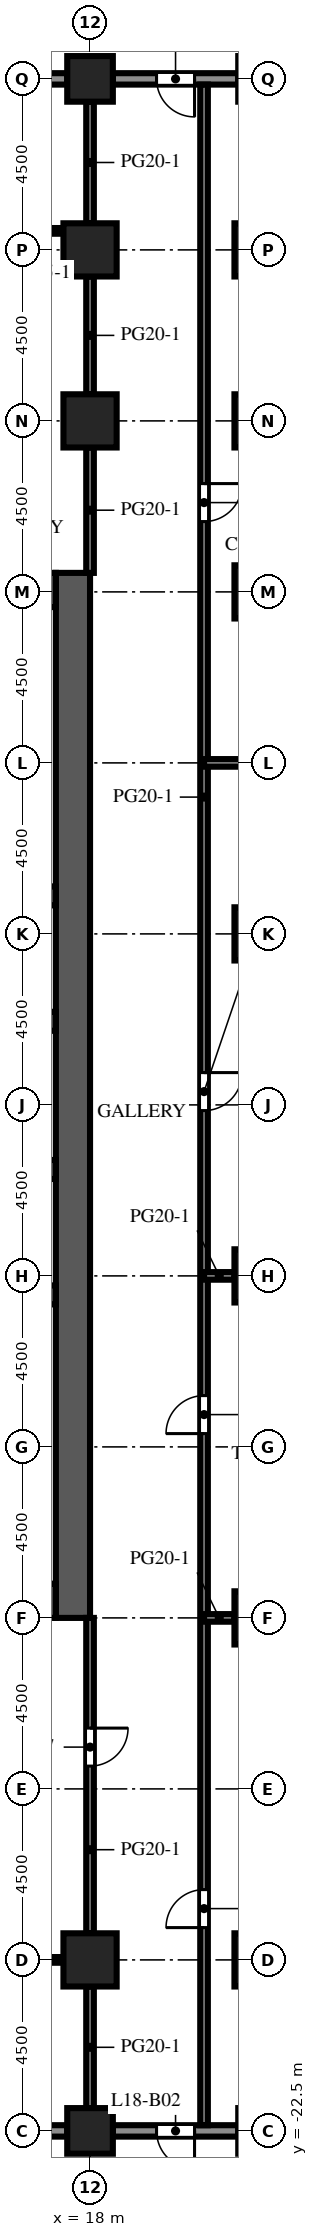
"""IFC4 building model, lengths in metres.
Left out: names, types, materials, properties, quantities, classifications, styles, units other than length and angle.
Written with IfcOpenShell. Run it as: python <this file> out.ifc"""

import sys

from ifc_helpers import new_model, si_unit, direction, frame, frame_2d, origin, origin_2d, place, context, subcontext, project, spatial, rectangle, extrude, element, fill, save


model = new_model("IFC4")
c1 = context("Model", 3, precision=1e-05, world=origin(), true_north=direction((0.0, 1.0)))
c2 = subcontext(c1, "Body", "Model", "MODEL_VIEW")
j1 = project(units=[si_unit("LENGTHUNIT", "METRE"), si_unit("PLANEANGLEUNIT", "RADIAN")], contexts=[c1])
p1 = place(None, origin())
s1 = spatial("IfcSite", under=j1, at=p1, CompositionType="ELEMENT")
p2 = place(p1, origin())
s2 = spatial("IfcBuilding", under=s1, at=p2, CompositionType="ELEMENT")
p3 = place(p2, frame((0.0, 0.0, 82.0)))
s3 = spatial("IfcBuildingStorey", under=s2, at=p3, CompositionType="ELEMENT", Elevation=82.0)
p4 = place(p3, frame((18.0, -22.5, 0.0), z_axis=(0.0, 0.0, 1.0), x_axis=(1.0, 0.0, 0.0)))
e1 = element("IfcColumn", 1, at=p4, inside=s3, PredefinedType="COLUMN", context=c2, shape_type="SweptSolid", body=[
    extrude(rectangle(XDim=1.2, YDim=1.2, at=origin_2d()), origin(), (0.0, 0.0, 1.0), 4.1),
])
p5 = place(p3, frame((18.0, 31.5, -0.45), z_axis=(0.0, 0.0, 1.0), x_axis=(1.0, 0.0, 0.0)))
e2 = element("IfcColumn", 2, at=p5, inside=s3, PredefinedType="COLUMN", context=c2, shape_type="SweptSolid", body=[
    extrude(rectangle(XDim=1.2, YDim=1.2, at=origin_2d()), origin(), (0.0, 0.0, 1.0), 4.55),
])
p6 = place(p3, frame((18.0, -18.0, 0.0), z_axis=(0.0, 0.0, 1.0), x_axis=(1.0, 0.0, 0.0)))
e3 = element("IfcColumn", 3, at=p6, inside=s3, PredefinedType="COLUMN", context=c2, shape_type="SweptSolid", body=[
    extrude(rectangle(XDim=1.4, YDim=1.4, at=origin_2d()), origin(), (0.0, 0.0, 1.0), 4.1),
])
for number, where, z_axis, x_axis in (
    (4, (18.0, 22.5, -0.45), (0.0, 0.0, 1.0), (1.0, 0.0, 0.0)),
    (5, (18.0, 27.0, -0.45), (0.0, 0.0, 1.0), (1.0, 0.0, 0.0)),
):
    element("IfcColumn", number, at=place(p3, frame(where, z_axis=z_axis, x_axis=x_axis)), inside=s3, PredefinedType="COLUMN", context=c2, shape_type="SweptSolid", body=[
        extrude(rectangle(XDim=1.4, YDim=1.4, at=origin_2d()), origin(), (0.0, 0.0, 1.0), 4.55),
    ])
for number, where, z_axis, x_axis in (
    (6, (22.5, -18.0, 0.0), (0.0, 0.0, 1.0), (1.0, 0.0, 0.0)),
    (7, (22.5, -9.0, 0.0), (0.0, 0.0, 1.0), (1.0, 0.0, 0.0)),
    (8, (22.5, 0.0, 0.0), (0.0, 0.0, 1.0), (1.0, 0.0, 0.0)),
    (9, (22.5, 9.0, 0.0), (0.0, 0.0, 1.0), (1.0, 0.0, 0.0)),
    (10, (22.5, 18.0, 0.0), (0.0, 0.0, 1.0), (1.0, 0.0, 0.0)),
    (11, (22.5, 22.5, 0.0), (0.0, 0.0, 1.0), (1.0, 0.0, 0.0)),
    (12, (22.5, 27.0, 0.0), (0.0, 0.0, 1.0), (1.0, 0.0, 0.0)),
):
    element("IfcColumn", number, at=place(p3, frame(where, z_axis=z_axis, x_axis=x_axis)), inside=s3, PredefinedType="COLUMN", context=c2, shape_type="SweptSolid", body=[
        extrude(rectangle(XDim=1.4, YDim=1.4, at=origin_2d()), origin(), (0.0, 0.0, 1.0), 4.1),
    ])
p7 = place(p3, frame((17.55, -9.0, 0.0), z_axis=(0.0, 0.0, 1.0), x_axis=(0.0, 1.0, 0.0)))
e13 = element("IfcWall", 13, at=p7, inside=s3, PredefinedType="SHEAR", context=c2, shape_type="SweptSolid", body=[
    extrude(rectangle(XDim=27.5, YDim=0.9, at=frame_2d((13.75, 0.0))), origin(), (0.0, 0.0, 1.0), 4.1),
])
p8 = place(p7, frame((12.55, 0.0, 0.0)))
e14 = element("IfcOpeningElement", 14, at=p8, cuts=e13, PredefinedType="OPENING", context=c2, shape_type="SweptSolid", body=[
    extrude(rectangle(XDim=2.4, YDim=2.4, at=frame_2d((1.2, 1.2))), frame((0.0, 0.46, 0.0), z_axis=(0.0, -1.0, 0.0), x_axis=(1.0, 0.0, 0.0)), (0.0, 0.0, 1.0), 0.92),
])
p9 = place(p7, frame((6.825, 0.0, 0.0)))
e15 = element("IfcOpeningElement", 15, at=p9, cuts=e13, PredefinedType="OPENING", context=c2, shape_type="SweptSolid", body=[
    extrude(rectangle(XDim=1.2, YDim=2.1, at=frame_2d((0.6, 1.05))), frame((0.0, 0.46, 0.0), z_axis=(0.0, -1.0, 0.0), x_axis=(1.0, 0.0, 0.0)), (0.0, 0.0, 1.0), 0.92),
])
p10 = place(p7, frame((19.475, 0.0, 0.0)))
e16 = element("IfcOpeningElement", 16, at=p10, cuts=e13, PredefinedType="OPENING", context=c2, shape_type="SweptSolid", body=[
    extrude(rectangle(XDim=1.2, YDim=2.1, at=frame_2d((0.6, 1.05))), frame((0.0, 0.46, 0.0), z_axis=(0.0, -1.0, 0.0), x_axis=(1.0, 0.0, 0.0)), (0.0, 0.0, 1.0), 0.92),
])
for number, where, z_axis, x_axis in (
    (17, (6.9, -8.55, 0.0), (0.0, 0.0, 1.0), (1.0, 0.0, 0.0)),
    (18, (6.9, 18.05, 0.0), (0.0, 0.0, 1.0), (1.0, 0.0, 0.0)),
):
    element("IfcWall", number, at=place(p3, frame(where, z_axis=z_axis, x_axis=x_axis)), inside=s3, PredefinedType="SHEAR", context=c2, shape_type="SweptSolid", body=[
        extrude(rectangle(XDim=10.2, YDim=0.9, at=frame_2d((5.1, 0.0))), origin(), (0.0, 0.0, 1.0), 4.1),
    ])
p11 = place(p3, frame((6.9, -0.5, 0.0), z_axis=(0.0, 0.0, 1.0), x_axis=(1.0, 0.0, 0.0)))
e19 = element("IfcWall", 19, at=p11, inside=s3, PredefinedType="SHEAR", context=c2, shape_type="SweptSolid", body=[
    extrude(rectangle(XDim=10.2, YDim=0.5, at=frame_2d((5.1, 0.0))), origin(), (0.0, 0.0, 1.0), 4.1),
])
p12 = place(p3, frame((6.9, 2.8, 0.0), z_axis=(0.0, 0.0, 1.0), x_axis=(1.0, 0.0, 0.0)))
e20 = element("IfcWall", 20, at=p12, inside=s3, PredefinedType="SHEAR", context=c2, shape_type="SweptSolid", body=[
    extrude(rectangle(XDim=10.2, YDim=0.5, at=frame_2d((5.1, 0.0))), origin(), (0.0, 0.0, 1.0), 4.1),
])
p13 = place(p12, frame((0.562, 0.0, 0.0)))
e21 = element("IfcOpeningElement", 21, at=p13, cuts=e20, PredefinedType="OPENING", context=c2, shape_type="SweptSolid", body=[
    extrude(rectangle(XDim=1.1, YDim=2.1, at=frame_2d((0.55, 1.05))), frame((0.0, 0.26, 0.0), z_axis=(0.0, -1.0, 0.0), x_axis=(1.0, 0.0, 0.0)), (0.0, 0.0, 1.0), 0.52),
])
p14 = place(p12, frame((3.238, 0.0, 0.0)))
e22 = element("IfcOpeningElement", 22, at=p14, cuts=e20, PredefinedType="OPENING", context=c2, shape_type="SweptSolid", body=[
    extrude(rectangle(XDim=1.1, YDim=2.1, at=frame_2d((0.55, 1.05))), frame((0.0, 0.26, 0.0), z_axis=(0.0, -1.0, 0.0), x_axis=(1.0, 0.0, 0.0)), (0.0, 0.0, 1.0), 0.52),
])
p15 = place(p12, frame((8.538, 0.0, 0.0)))
e23 = element("IfcOpeningElement", 23, at=p15, cuts=e20, PredefinedType="OPENING", context=c2, shape_type="SweptSolid", body=[
    extrude(rectangle(XDim=1.1, YDim=2.1, at=frame_2d((0.55, 1.05))), frame((0.0, 0.26, 0.0), z_axis=(0.0, -1.0, 0.0), x_axis=(1.0, 0.0, 0.0)), (0.0, 0.0, 1.0), 0.52),
])
p16 = place(p3, frame((6.9, 6.7, 0.0), z_axis=(0.0, 0.0, 1.0), x_axis=(1.0, 0.0, 0.0)))
e24 = element("IfcWall", 24, at=p16, inside=s3, PredefinedType="SHEAR", context=c2, shape_type="SweptSolid", body=[
    extrude(rectangle(XDim=10.2, YDim=0.5, at=frame_2d((5.1, 0.0))), origin(), (0.0, 0.0, 1.0), 4.1),
])
p17 = place(p16, frame((0.562, 0.0, 0.0)))
e25 = element("IfcOpeningElement", 25, at=p17, cuts=e24, PredefinedType="OPENING", context=c2, shape_type="SweptSolid", body=[
    extrude(rectangle(XDim=1.1, YDim=2.1, at=frame_2d((0.55, 1.05))), frame((0.0, 0.26, 0.0), z_axis=(0.0, -1.0, 0.0), x_axis=(1.0, 0.0, 0.0)), (0.0, 0.0, 1.0), 0.52),
])
p18 = place(p16, frame((3.288, 0.0, 0.0)))
e26 = element("IfcOpeningElement", 26, at=p18, cuts=e24, PredefinedType="OPENING", context=c2, shape_type="SweptSolid", body=[
    extrude(rectangle(XDim=1.0, YDim=2.1, at=frame_2d((0.5, 1.05))), frame((0.0, 0.26, 0.0), z_axis=(0.0, -1.0, 0.0), x_axis=(1.0, 0.0, 0.0)), (0.0, 0.0, 1.0), 0.52),
])
p19 = place(p16, frame((5.913, 0.0, 0.0)))
e27 = element("IfcOpeningElement", 27, at=p19, cuts=e24, PredefinedType="OPENING", context=c2, shape_type="SweptSolid", body=[
    extrude(rectangle(XDim=1.0, YDim=2.1, at=frame_2d((0.5, 1.05))), frame((0.0, 0.26, 0.0), z_axis=(0.0, -1.0, 0.0), x_axis=(1.0, 0.0, 0.0)), (0.0, 0.0, 1.0), 0.52),
])
p20 = place(p16, frame((8.587, 0.0, 0.0)))
e28 = element("IfcOpeningElement", 28, at=p20, cuts=e24, PredefinedType="OPENING", context=c2, shape_type="SweptSolid", body=[
    extrude(rectangle(XDim=1.0, YDim=2.1, at=frame_2d((0.5, 1.05))), frame((0.0, 0.26, 0.0), z_axis=(0.0, -1.0, 0.0), x_axis=(1.0, 0.0, 0.0)), (0.0, 0.0, 1.0), 0.52),
])
p21 = place(p3, frame((6.9, 10.0, 0.0), z_axis=(0.0, 0.0, 1.0), x_axis=(1.0, 0.0, 0.0)))
e29 = element("IfcWall", 29, at=p21, inside=s3, PredefinedType="SHEAR", context=c2, shape_type="SweptSolid", body=[
    extrude(rectangle(XDim=10.2, YDim=0.5, at=frame_2d((5.1, 0.0))), origin(), (0.0, 0.0, 1.0), 4.1),
])
p22 = place(p3, frame((17.4, -22.5, 0.0), z_axis=(0.0, 0.0, 1.0), x_axis=(-1.0, 0.0, 0.0)))
e30 = element("IfcWall", 30, at=p22, inside=s3, PredefinedType="SOLIDWALL", context=c2, shape_type="SweptSolid", body=[
    extrude(rectangle(XDim=3.3, YDim=0.3, at=frame_2d((1.65, 0.0))), origin(), (0.0, 0.0, 1.0), 2.75),
])
p23 = place(p22, frame((0.45, 0.0, 0.8)))
e31 = element("IfcOpeningElement", 31, at=p23, cuts=e30, PredefinedType="OPENING", context=c2, shape_type="SweptSolid", body=[
    extrude(rectangle(XDim=2.4, YDim=1.7, at=frame_2d((1.2, 0.85))), frame((0.0, 0.16, 0.0), z_axis=(0.0, -1.0, 0.0), x_axis=(1.0, 0.0, 0.0)), (0.0, 0.0, 1.0), 0.32),
])
p24 = place(p3, frame((21.9, -22.5, 0.0), z_axis=(0.0, 0.0, 1.0), x_axis=(-1.0, 0.0, 0.0)))
e32 = element("IfcWall", 32, at=p24, inside=s3, PredefinedType="SOLIDWALL", context=c2, shape_type="SweptSolid", body=[
    extrude(rectangle(XDim=3.3, YDim=0.3, at=frame_2d((1.65, 0.0))), origin(), (0.0, 0.0, 1.0), 2.75),
])
p25 = place(p24, frame((1.15, 0.0, 0.0)))
e33 = element("IfcOpeningElement", 33, at=p25, cuts=e32, PredefinedType="OPENING", context=c2, shape_type="SweptSolid", body=[
    extrude(rectangle(XDim=1.0, YDim=2.2, at=frame_2d((0.5, 1.1))), frame((0.0, 0.16, 0.0), z_axis=(0.0, -1.0, 0.0), x_axis=(1.0, 0.0, 0.0)), (0.0, 0.0, 1.0), 0.32),
])
p26 = place(p3, frame((18.6, 31.5, 0.0), z_axis=(0.0, 0.0, 1.0), x_axis=(1.0, 0.0, 0.0)))
e34 = element("IfcWall", 34, at=p26, inside=s3, PredefinedType="SOLIDWALL", context=c2, shape_type="SweptSolid", body=[
    extrude(rectangle(XDim=3.3, YDim=0.3, at=frame_2d((1.65, 0.0))), origin(), (0.0, 0.0, 1.0), 2.75),
])
p27 = place(p26, frame((1.15, 0.0, 0.0)))
e35 = element("IfcOpeningElement", 35, at=p27, cuts=e34, PredefinedType="OPENING", context=c2, shape_type="SweptSolid", body=[
    extrude(rectangle(XDim=1.0, YDim=2.2, at=frame_2d((0.5, 1.1))), frame((0.0, 0.16, 0.0), z_axis=(0.0, -1.0, 0.0), x_axis=(1.0, 0.0, 0.0)), (0.0, 0.0, 1.0), 0.32),
])
p28 = place(p3, frame((14.1, 31.5, 0.0), z_axis=(0.0, 0.0, 1.0), x_axis=(1.0, 0.0, 0.0)))
e36 = element("IfcWall", 36, at=p28, inside=s3, PredefinedType="SOLIDWALL", context=c2, shape_type="SweptSolid", body=[
    extrude(rectangle(XDim=3.3, YDim=0.3, at=frame_2d((1.65, 0.0))), origin(), (0.0, 0.0, 1.0), 2.75),
])
p29 = place(p28, frame((0.45, 0.0, 0.8)))
e37 = element("IfcOpeningElement", 37, at=p29, cuts=e36, PredefinedType="OPENING", context=c2, shape_type="SweptSolid", body=[
    extrude(rectangle(XDim=2.4, YDim=1.7, at=frame_2d((1.2, 0.85))), frame((0.0, 0.16, 0.0), z_axis=(0.0, -1.0, 0.0), x_axis=(1.0, 0.0, 0.0)), (0.0, 0.0, 1.0), 0.32),
])
p30 = place(p3, frame((18.0, -21.9, 0.0), z_axis=(0.0, 0.0, 1.0), x_axis=(0.0, 1.0, 0.0)))
e38 = element("IfcWall", 38, at=p30, inside=s3, PredefinedType="PARTITIONING", context=c2, shape_type="SweptSolid", body=[
    extrude(rectangle(XDim=3.2, YDim=0.2, at=frame_2d((1.6, 0.0))), origin(), (0.0, 0.0, 1.0), 3.65),
])
p31 = place(p3, frame((18.0, -17.3, 0.0), z_axis=(0.0, 0.0, 1.0), x_axis=(0.0, 1.0, 0.0)))
e39 = element("IfcWall", 39, at=p31, inside=s3, PredefinedType="PARTITIONING", context=c2, shape_type="SweptSolid", body=[
    extrude(rectangle(XDim=8.3, YDim=0.2, at=frame_2d((4.15, 0.0))), origin(), (0.0, 0.0, 1.0), 3.65),
])
p32 = place(p31, frame((4.4, 0.0, 0.0)))
e40 = element("IfcOpeningElement", 40, at=p32, cuts=e39, PredefinedType="OPENING", context=c2, shape_type="SweptSolid", body=[
    extrude(rectangle(XDim=1.0, YDim=2.1, at=frame_2d((0.5, 1.05))), frame((0.0, 0.11, 0.0), z_axis=(0.0, -1.0, 0.0), x_axis=(1.0, 0.0, 0.0)), (0.0, 0.0, 1.0), 0.22),
])
p33 = place(p3, frame((18.0, 18.5, 0.0), z_axis=(0.0, 0.0, 1.0), x_axis=(0.0, 1.0, 0.0)))
e41 = element("IfcWall", 41, at=p33, inside=s3, PredefinedType="PARTITIONING", context=c2, shape_type="SweptSolid", body=[
    extrude(rectangle(XDim=3.3, YDim=0.2, at=frame_2d((1.65, 0.0))), origin(), (0.0, 0.0, 1.0), 3.65),
])
p34 = place(p3, frame((18.0, 23.2, 0.0), z_axis=(0.0, 0.0, 1.0), x_axis=(0.0, 1.0, 0.0)))
e42 = element("IfcWall", 42, at=p34, inside=s3, PredefinedType="PARTITIONING", context=c2, shape_type="SweptSolid", body=[
    extrude(rectangle(XDim=3.1, YDim=0.2, at=frame_2d((1.55, 0.0))), origin(), (0.0, 0.0, 1.0), 3.65),
])
p35 = place(p3, frame((18.0, 27.7, 0.0), z_axis=(0.0, 0.0, 1.0), x_axis=(0.0, 1.0, 0.0)))
e43 = element("IfcWall", 43, at=p35, inside=s3, PredefinedType="PARTITIONING", context=c2, shape_type="SweptSolid", body=[
    extrude(rectangle(XDim=3.2, YDim=0.2, at=frame_2d((1.6, 0.0))), origin(), (0.0, 0.0, 1.0), 3.65),
])
p36 = place(p3, frame((21.0, 31.35, 0.0), z_axis=(0.0, 0.0, 1.0), x_axis=(0.0, -1.0, 0.0)))
e44 = element("IfcWall", 44, at=p36, inside=s3, PredefinedType="PARTITIONING", context=c2, shape_type="SweptSolid", body=[
    extrude(rectangle(XDim=53.7, YDim=0.2, at=frame_2d((26.85, 0.0))), origin(), (0.0, 0.0, 1.0), 3.65),
])
p37 = place(p36, frame((47.5, 0.0, 0.0)))
e45 = element("IfcOpeningElement", 45, at=p37, cuts=e44, PredefinedType="OPENING", context=c2, shape_type="SweptSolid", body=[
    extrude(rectangle(XDim=1.0, YDim=2.1, at=frame_2d((0.5, 1.05))), frame((0.0, 0.11, 0.0), z_axis=(0.0, -1.0, 0.0), x_axis=(1.0, 0.0, 0.0)), (0.0, 0.0, 1.0), 0.22),
])
p38 = place(p36, frame((34.5, 0.0, 0.0)))
e46 = element("IfcOpeningElement", 46, at=p38, cuts=e44, PredefinedType="OPENING", context=c2, shape_type="SweptSolid", body=[
    extrude(rectangle(XDim=1.0, YDim=2.1, at=frame_2d((0.5, 1.05))), frame((0.0, 0.11, 0.0), z_axis=(0.0, -1.0, 0.0), x_axis=(1.0, 0.0, 0.0)), (0.0, 0.0, 1.0), 0.22),
])
p39 = place(p36, frame((26.0, 0.0, 0.0)))
e47 = element("IfcOpeningElement", 47, at=p39, cuts=e44, PredefinedType="OPENING", context=c2, shape_type="SweptSolid", body=[
    extrude(rectangle(XDim=1.0, YDim=2.1, at=frame_2d((0.5, 1.05))), frame((0.0, 0.11, 0.0), z_axis=(0.0, -1.0, 0.0), x_axis=(1.0, 0.0, 0.0)), (0.0, 0.0, 1.0), 0.22),
])
p40 = place(p36, frame((10.5, 0.0, 0.0)))
e48 = element("IfcOpeningElement", 48, at=p40, cuts=e44, PredefinedType="OPENING", context=c2, shape_type="SweptSolid", body=[
    extrude(rectangle(XDim=1.0, YDim=2.1, at=frame_2d((0.5, 1.05))), frame((0.0, 0.11, 0.0), z_axis=(0.0, -1.0, 0.0), x_axis=(1.0, 0.0, 0.0)), (0.0, 0.0, 1.0), 0.22),
])
p41 = place(p3, frame((17.3, -18.0, 0.0), z_axis=(0.0, 0.0, 1.0), x_axis=(-1.0, 0.0, 0.0)))
e49 = element("IfcWall", 49, at=p41, inside=s3, PredefinedType="PARTITIONING", context=c2, shape_type="SweptSolid", body=[
    extrude(rectangle(XDim=7.6, YDim=0.15, at=frame_2d((3.8, 0.0))), origin(), (0.0, 0.0, 1.0), 3.65),
])
p42 = place(p41, frame((6.45, 0.0, 0.0)))
e50 = element("IfcOpeningElement", 50, at=p42, cuts=e49, PredefinedType="OPENING", context=c2, shape_type="SweptSolid", body=[
    extrude(rectangle(XDim=1.0, YDim=2.1, at=frame_2d((0.5, 1.05))), frame((0.0, 0.085, 0.0), z_axis=(0.0, -1.0, 0.0), x_axis=(1.0, 0.0, 0.0)), (0.0, 0.0, 1.0), 0.17),
])
p43 = place(p41, frame((1.45, 0.0, 0.0)))
e51 = element("IfcOpeningElement", 51, at=p43, cuts=e49, PredefinedType="OPENING", context=c2, shape_type="SweptSolid", body=[
    extrude(rectangle(XDim=1.0, YDim=2.1, at=frame_2d((0.5, 1.05))), frame((0.0, 0.085, 0.0), z_axis=(0.0, -1.0, 0.0), x_axis=(1.0, 0.0, 0.0)), (0.0, 0.0, 1.0), 0.17),
])
for number, where, z_axis, x_axis in (
    (52, (21.0, -9.0, 0.0), (0.0, 0.0, 1.0), (1.0, 0.0, 0.0)),
    (53, (21.0, 0.0, 0.0), (0.0, 0.0, 1.0), (1.0, 0.0, 0.0)),
):
    element("IfcWall", number, at=place(p3, frame(where, z_axis=z_axis, x_axis=x_axis)), inside=s3, PredefinedType="PARTITIONING", context=c2, shape_type="SweptSolid", body=[
        extrude(rectangle(XDim=0.8, YDim=0.2, at=frame_2d((0.4, 0.0))), origin(), (0.0, 0.0, 1.0), 3.65),
    ])
p44 = place(p3, frame((21.0, 13.5, 0.0), z_axis=(0.0, 0.0, 1.0), x_axis=(1.0, 0.0, 0.0)))
e54 = element("IfcWall", 54, at=p44, inside=s3, PredefinedType="PARTITIONING", context=c2, shape_type="SweptSolid", body=[
    extrude(rectangle(XDim=9.9, YDim=0.2, at=frame_2d((4.95, 0.0))), origin(), (0.0, 0.0, 1.0), 3.65),
])
p45 = place(p3, frame((14.1, 27.5, 0.0), z_axis=(0.0, 0.0, 1.0), x_axis=(1.0, 0.0, 0.0)))
e55 = element("IfcWall", 55, at=p45, inside=s3, PredefinedType="PARTITIONING", context=c2, shape_type="SweptSolid", body=[
    extrude(rectangle(XDim=3.2, YDim=0.15, at=frame_2d((1.6, 0.0))), origin(), (0.0, 0.0, 1.0), 3.65),
])
p46 = place(p45, frame((1.0, 0.0, 0.0)))
e56 = element("IfcOpeningElement", 56, at=p46, cuts=e55, PredefinedType="OPENING", context=c2, shape_type="SweptSolid", body=[
    extrude(rectangle(XDim=1.0, YDim=2.1, at=frame_2d((0.5, 1.05))), frame((0.0, 0.085, 0.0), z_axis=(0.0, -1.0, 0.0), x_axis=(1.0, 0.0, 0.0)), (0.0, 0.0, 1.0), 0.17),
])
p47 = place(p25, origin())
e57 = element("IfcDoor", 57, at=p47, inside=s3, OperationType="SINGLE_SWING_LEFT", PredefinedType="DOOR", context=c2, shape_type="SweptSolid", body=[
    extrude(rectangle(XDim=1.0, YDim=2.2, at=frame_2d((0.5, 1.1))), frame((0.0, 0.025, 0.0), z_axis=(0.0, -1.0, 0.0), x_axis=(1.0, 0.0, 0.0)), (0.0, 0.0, 1.0), 0.05),
])
fill(e33, e57)
p48 = place(p27, origin())
e58 = element("IfcDoor", 58, at=p48, inside=s3, OperationType="SINGLE_SWING_RIGHT", PredefinedType="DOOR", context=c2, shape_type="SweptSolid", body=[
    extrude(rectangle(XDim=1.0, YDim=2.2, at=frame_2d((0.5, 1.1))), frame((0.0, 0.025, 0.0), z_axis=(0.0, -1.0, 0.0), x_axis=(1.0, 0.0, 0.0)), (0.0, 0.0, 1.0), 0.05),
])
fill(e35, e58)
p49 = place(p8, origin())
e59 = element("IfcDoor", 59, at=p49, inside=s3, OperationType="DOUBLE_DOOR_DOUBLE_SWING", PredefinedType="DOOR", context=c2, shape_type="SweptSolid", body=[
    extrude(rectangle(XDim=2.4, YDim=2.4, at=frame_2d((1.2, 1.2))), frame((0.0, 0.025, 0.0), z_axis=(0.0, -1.0, 0.0), x_axis=(1.0, 0.0, 0.0)), (0.0, 0.0, 1.0), 0.05),
])
fill(e14, e59)
p50 = place(p9, frame((1.2, 0.0, 0.0), z_axis=(0.0, 0.0, 1.0), x_axis=(-1.0, 0.0, 0.0)))
e60 = element("IfcDoor", 60, at=p50, inside=s3, OperationType="SINGLE_SWING_LEFT", PredefinedType="DOOR", context=c2, shape_type="SweptSolid", body=[
    extrude(rectangle(XDim=1.2, YDim=2.1, at=frame_2d((0.6, 1.05))), frame((0.0, 0.025, 0.0), z_axis=(0.0, -1.0, 0.0), x_axis=(1.0, 0.0, 0.0)), (0.0, 0.0, 1.0), 0.05),
])
fill(e15, e60)
p51 = place(p10, frame((1.2, 0.0, 0.0), z_axis=(0.0, 0.0, 1.0), x_axis=(-1.0, 0.0, 0.0)))
e61 = element("IfcDoor", 61, at=p51, inside=s3, OperationType="SINGLE_SWING_LEFT", PredefinedType="DOOR", context=c2, shape_type="SweptSolid", body=[
    extrude(rectangle(XDim=1.2, YDim=2.1, at=frame_2d((0.6, 1.05))), frame((0.0, 0.025, 0.0), z_axis=(0.0, -1.0, 0.0), x_axis=(1.0, 0.0, 0.0)), (0.0, 0.0, 1.0), 0.05),
])
fill(e16, e61)
p52 = place(p32, origin())
e62 = element("IfcDoor", 62, at=p52, inside=s3, OperationType="SINGLE_SWING_RIGHT", PredefinedType="DOOR", context=c2, shape_type="SweptSolid", body=[
    extrude(rectangle(XDim=1.0, YDim=2.1, at=frame_2d((0.5, 1.05))), frame((0.0, 0.025, 0.0), z_axis=(0.0, -1.0, 0.0), x_axis=(1.0, 0.0, 0.0)), (0.0, 0.0, 1.0), 0.05),
])
fill(e40, e62)
p53 = place(p37, origin())
e63 = element("IfcDoor", 63, at=p53, inside=s3, OperationType="SINGLE_SWING_RIGHT", PredefinedType="DOOR", context=c2, shape_type="SweptSolid", body=[
    extrude(rectangle(XDim=1.0, YDim=2.1, at=frame_2d((0.5, 1.05))), frame((0.0, 0.025, 0.0), z_axis=(0.0, -1.0, 0.0), x_axis=(1.0, 0.0, 0.0)), (0.0, 0.0, 1.0), 0.05),
])
fill(e45, e63)
p54 = place(p38, origin())
e64 = element("IfcDoor", 64, at=p54, inside=s3, OperationType="SINGLE_SWING_RIGHT", PredefinedType="DOOR", context=c2, shape_type="SweptSolid", body=[
    extrude(rectangle(XDim=1.0, YDim=2.1, at=frame_2d((0.5, 1.05))), frame((0.0, 0.025, 0.0), z_axis=(0.0, -1.0, 0.0), x_axis=(1.0, 0.0, 0.0)), (0.0, 0.0, 1.0), 0.05),
])
fill(e46, e64)
p55 = place(p39, origin())
e65 = element("IfcDoor", 65, at=p55, inside=s3, OperationType="SINGLE_SWING_LEFT", PredefinedType="DOOR", context=c2, shape_type="SweptSolid", body=[
    extrude(rectangle(XDim=1.0, YDim=2.1, at=frame_2d((0.5, 1.05))), frame((0.0, 0.025, 0.0), z_axis=(0.0, -1.0, 0.0), x_axis=(1.0, 0.0, 0.0)), (0.0, 0.0, 1.0), 0.05),
])
fill(e47, e65)
p56 = place(p40, origin())
e66 = element("IfcDoor", 66, at=p56, inside=s3, OperationType="SINGLE_SWING_LEFT", PredefinedType="DOOR", context=c2, shape_type="SweptSolid", body=[
    extrude(rectangle(XDim=1.0, YDim=2.1, at=frame_2d((0.5, 1.05))), frame((0.0, 0.025, 0.0), z_axis=(0.0, -1.0, 0.0), x_axis=(1.0, 0.0, 0.0)), (0.0, 0.0, 1.0), 0.05),
])
fill(e48, e66)
save(model, sys.argv[1])
